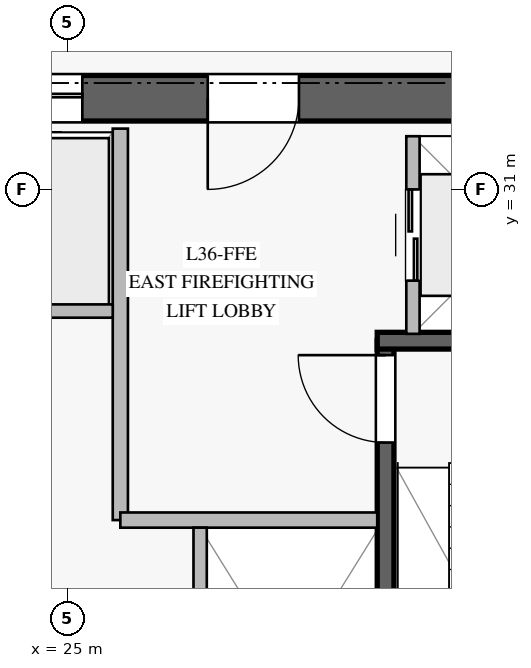
"""IFC4 building model, lengths in metres.
Left out: names, types, materials, properties, quantities, classifications, styles, units other than length and angle.
Written with IfcOpenShell. Run it as: python <this file> out.ifc"""

import sys

from ifc_helpers import new_model, si_unit, direction, frame, frame_2d, origin, place, context, subcontext, project, spatial, rectangle, extrude, element, fill, save


model = new_model("IFC4")
c1 = context("Model", 3, precision=1e-05, world=origin(), true_north=direction((0.0, 1.0)))
c2 = subcontext(c1, "Body", "Model", "MODEL_VIEW")
j1 = project(units=[si_unit("LENGTHUNIT", "METRE"), si_unit("PLANEANGLEUNIT", "RADIAN")], contexts=[c1])
p1 = place(None, origin())
s1 = spatial("IfcSite", under=j1, at=p1, CompositionType="ELEMENT")
p2 = place(p1, origin())
s2 = spatial("IfcBuilding", under=s1, at=p2, CompositionType="ELEMENT")
p3 = place(p2, frame((0.0, 0.0, 150.4)))
s3 = spatial("IfcBuildingStorey", under=s2, at=p3, CompositionType="ELEMENT", Elevation=150.4)
p4 = place(p3, frame((33.1, 32.2, 0.0), z_axis=(0.0, 0.0, 1.0), x_axis=(-1.0, 0.0, 0.0)))
e1 = element("IfcWall", 1, at=p4, inside=s3, PredefinedType="SHEAR", context=c2, shape_type="SweptSolid", body=[
    extrude(rectangle(XDim=16.2, YDim=0.6, at=frame_2d((8.1, 0.0))), origin(), (0.0, 0.0, 1.0), 3.76),
])
p5 = place(p4, frame((5.05, 0.0, 0.0)))
e2 = element("IfcOpeningElement", 2, at=p5, cuts=e1, PredefinedType="OPENING", context=c2, shape_type="SweptSolid", body=[
    extrude(rectangle(XDim=1.2, YDim=2.25, at=frame_2d((0.6, 1.125))), frame((0.0, 0.31, 0.0), z_axis=(0.0, -1.0, 0.0), x_axis=(1.0, 0.0, 0.0)), (0.0, 0.0, 1.0), 0.62),
])
p6 = place(p4, frame((11.85, 0.0, 0.0)))
e3 = element("IfcOpeningElement", 3, at=p6, cuts=e1, PredefinedType="OPENING", context=c2, shape_type="SweptSolid", body=[
    extrude(rectangle(XDim=1.1, YDim=2.2, at=frame_2d((0.55, 1.1))), frame((0.0, 0.31, 0.0), z_axis=(0.0, -1.0, 0.0), x_axis=(1.0, 0.0, 0.0)), (0.0, 0.0, 1.0), 0.62),
])
p7 = place(p4, frame((9.875, 0.0, 0.0)))
e4 = element("IfcOpeningElement", 4, at=p7, cuts=e1, PredefinedType="OPENING", context=c2, shape_type="SweptSolid", body=[
    extrude(rectangle(XDim=1.1, YDim=2.2, at=frame_2d((0.55, 1.1))), frame((0.0, 0.31, 0.0), z_axis=(0.0, -1.0, 0.0), x_axis=(1.0, 0.0, 0.0)), (0.0, 0.0, 1.0), 0.62),
])
p8 = place(p4, frame((7.9, 0.0, 0.0)))
e5 = element("IfcOpeningElement", 5, at=p8, cuts=e1, PredefinedType="OPENING", context=c2, shape_type="SweptSolid", body=[
    extrude(rectangle(XDim=1.1, YDim=2.2, at=frame_2d((0.55, 1.1))), frame((0.0, 0.31, 0.0), z_axis=(0.0, -1.0, 0.0), x_axis=(1.0, 0.0, 0.0)), (0.0, 0.0, 1.0), 0.62),
])
p9 = place(p3, frame((29.19, 21.79, 0.0), z_axis=(0.0, 0.0, 1.0), x_axis=(0.0, 1.0, 0.0)))
e6 = element("IfcWall", 6, at=p9, inside=s3, PredefinedType="SOLIDWALL", context=c2, shape_type="SweptSolid", body=[
    extrude(rectangle(XDim=7.22, YDim=0.22, at=frame_2d((3.61, 0.0))), origin(), (0.0, 0.0, 1.0), 3.76),
])
p10 = place(p9, frame((5.88, 0.0, 0.0)))
e7 = element("IfcOpeningElement", 7, at=p10, cuts=e6, PredefinedType="OPENING", context=c2, shape_type="SweptSolid", body=[
    extrude(rectangle(XDim=1.15, YDim=2.2, at=frame_2d((0.575, 1.1))), frame((0.0, 0.12, 0.0), z_axis=(0.0, -1.0, 0.0), x_axis=(1.0, 0.0, 0.0)), (0.0, 0.0, 1.0), 0.24),
])
p11 = place(p3, frame((29.08, 29.01, 0.0), z_axis=(0.0, 0.0, 1.0), x_axis=(1.0, 0.0, 0.0)))
e8 = element("IfcWall", 8, at=p11, inside=s3, PredefinedType="SOLIDWALL", context=c2, shape_type="SweptSolid", body=[
    extrude(rectangle(XDim=3.72, YDim=0.22, at=frame_2d((1.86, 0.0))), origin(), (0.0, 0.0, 1.0), 3.76),
])
p12 = place(p3, frame((25.7, 26.65, 0.0), z_axis=(0.0, 0.0, 1.0), x_axis=(0.0, 1.0, 0.0)))
e9 = element("IfcWall", 9, at=p12, inside=s3, PredefinedType="PARTITIONING", context=c2, shape_type="SweptSolid", body=[
    extrude(rectangle(XDim=5.15, YDim=0.2, at=frame_2d((2.575, 0.0))), origin(), (0.0, 0.0, 1.0), 3.76),
])
p13 = place(p3, frame((25.7, 26.65, 0.0), z_axis=(0.0, 0.0, 1.0), x_axis=(1.0, 0.0, 0.0)))
e10 = element("IfcWall", 10, at=p13, inside=s3, PredefinedType="PARTITIONING", context=c2, shape_type="SweptSolid", body=[
    extrude(rectangle(XDim=3.38, YDim=0.2, at=frame_2d((1.69, 0.0))), origin(), (0.0, 0.0, 1.0), 3.76),
])
for number, where, z_axis, x_axis in (
    (11, (23.7, 29.4, 0.0), (0.0, 0.0, 1.0), (1.0, 0.0, 0.0)),
    (12, (26.75, 24.65, 0.0), (0.0, 0.0, 1.0), (0.0, 1.0, 0.0)),
):
    element("IfcWall", number, at=place(p3, frame(where, z_axis=z_axis, x_axis=x_axis)), inside=s3, PredefinedType="PARTITIONING", context=c2, shape_type="SweptSolid", body=[
        extrude(rectangle(XDim=1.9, YDim=0.175, at=frame_2d((0.95, 0.0))), origin(), (0.0, 0.0, 1.0), 3.76),
    ])
p14 = place(p3, frame((29.55, 29.1, 0.0), z_axis=(0.0, 0.0, 1.0), x_axis=(0.0, 1.0, 0.0)))
e13 = element("IfcWall", 13, at=p14, inside=s3, PredefinedType="PARTITIONING", context=c2, shape_type="SweptSolid", body=[
    extrude(rectangle(XDim=2.6, YDim=0.175, at=frame_2d((1.3, 0.0))), origin(), (0.0, 0.0, 1.0), 3.76),
])
p15 = place(p14, frame((0.7, 0.0, 0.0)))
e14 = element("IfcOpeningElement", 14, at=p15, cuts=e13, PredefinedType="OPENING", context=c2, shape_type="SweptSolid", body=[
    extrude(rectangle(XDim=1.2, YDim=2.2, at=frame_2d((0.6, 1.1))), frame((0.0, 0.098, 0.0), z_axis=(0.0, -1.0, 0.0), x_axis=(1.0, 0.0, 0.0)), (0.0, 0.0, 1.0), 0.195),
])
p16 = place(p10, origin())
e15 = element("IfcDoor", 15, at=p16, inside=s3, OperationType="SINGLE_SWING_RIGHT", PredefinedType="DOOR", context=c2, shape_type="SweptSolid", body=[
    extrude(rectangle(XDim=1.15, YDim=2.2, at=frame_2d((0.575, 1.1))), frame((0.0, 0.025, 0.0), z_axis=(0.0, -1.0, 0.0), x_axis=(1.0, 0.0, 0.0)), (0.0, 0.0, 1.0), 0.05),
])
fill(e7, e15)
p17 = place(p5, origin())
e16 = element("IfcDoor", 16, at=p17, inside=s3, OperationType="SINGLE_SWING_RIGHT", PredefinedType="DOOR", context=c2, shape_type="SweptSolid", body=[
    extrude(rectangle(XDim=1.2, YDim=2.25, at=frame_2d((0.6, 1.125))), frame((0.0, 0.025, 0.0), z_axis=(0.0, -1.0, 0.0), x_axis=(1.0, 0.0, 0.0)), (0.0, 0.0, 1.0), 0.05),
])
fill(e2, e16)
p18 = place(p8, origin())
e17 = element("IfcDoor", 17, at=p18, inside=s3, OperationType="DOUBLE_DOOR_SLIDING", PredefinedType="DOOR", context=c2, shape_type="SweptSolid", body=[
    extrude(rectangle(XDim=1.1, YDim=2.2, at=frame_2d((0.55, 1.1))), frame((0.0, 0.025, 0.0), z_axis=(0.0, -1.0, 0.0), x_axis=(1.0, 0.0, 0.0)), (0.0, 0.0, 1.0), 0.05),
])
fill(e5, e17)
p19 = place(p15, origin())
e18 = element("IfcDoor", 18, at=p19, inside=s3, OperationType="DOUBLE_DOOR_SLIDING", PredefinedType="DOOR", context=c2, shape_type="SweptSolid", body=[
    extrude(rectangle(XDim=1.2, YDim=2.2, at=frame_2d((0.6, 1.1))), frame((0.0, 0.025, 0.0), z_axis=(0.0, -1.0, 0.0), x_axis=(1.0, 0.0, 0.0)), (0.0, 0.0, 1.0), 0.05),
])
fill(e14, e18)
save(model, sys.argv[1])
